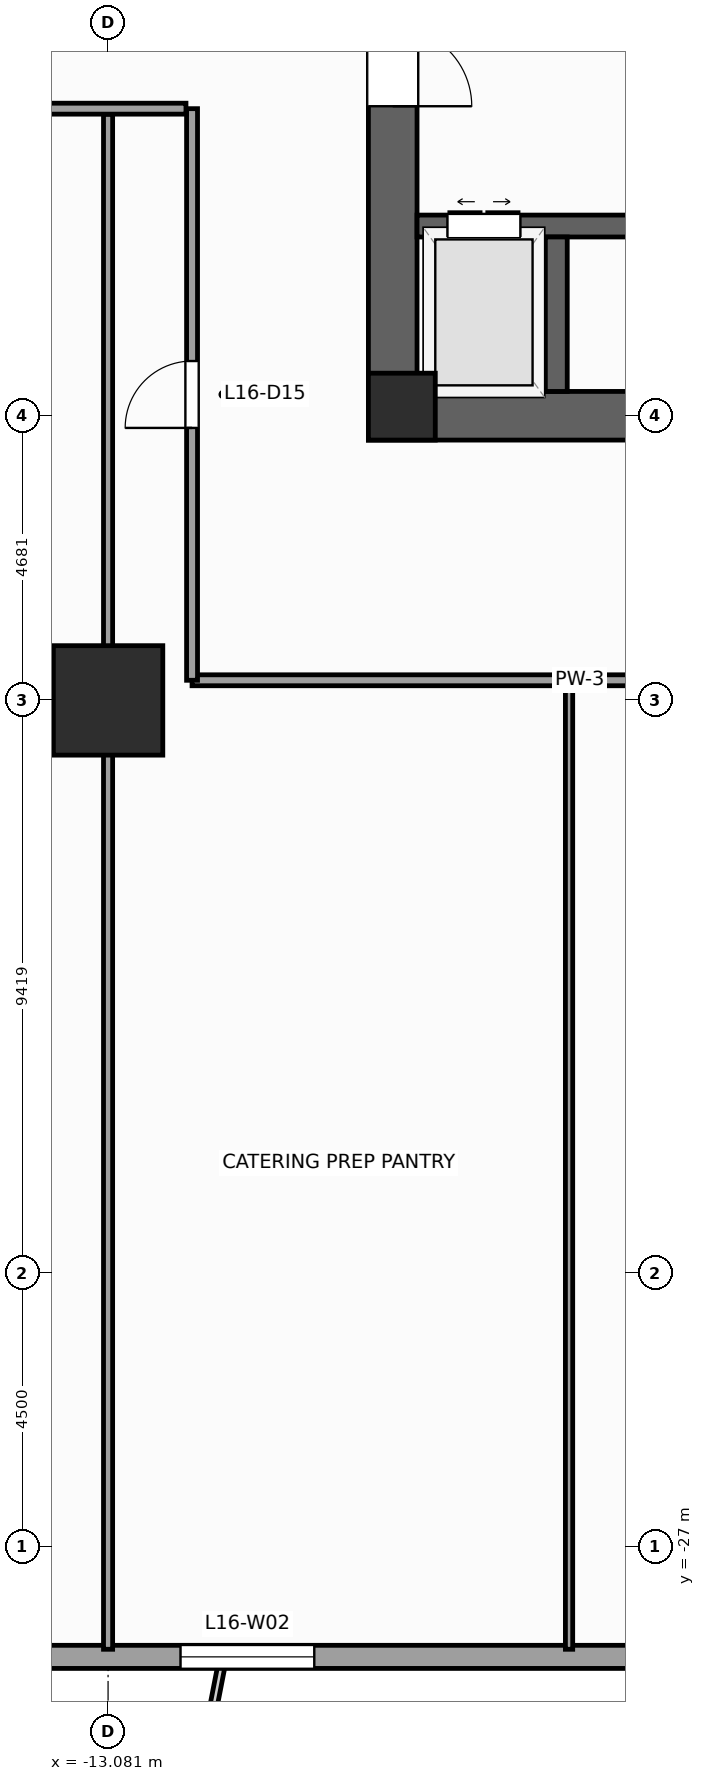
"""IFC4 building model, lengths in metres.
Left out: names, types, materials, properties, quantities, classifications, styles, units other than length and angle.
Written with IfcOpenShell. Run it as: python <this file> out.ifc"""

import sys

from ifc_helpers import new_model, si_unit, direction, frame, frame_2d, origin, origin_2d, place, context, subcontext, project, spatial, rectangle, extrude, source, transform, mapped, element, fill, save


model = new_model("IFC4")
c1 = context("Model", 3, precision=1e-05, world=origin(), true_north=direction((0.0, 1.0)))
c2 = subcontext(c1, "Body", "Model", "MODEL_VIEW")
j1 = project(units=[si_unit("LENGTHUNIT", "METRE"), si_unit("PLANEANGLEUNIT", "RADIAN")], contexts=[c1])
p1 = place(None, origin())
s1 = spatial("IfcSite", under=j1, at=p1, CompositionType="ELEMENT")
p2 = place(p1, origin())
s2 = spatial("IfcBuilding", under=s1, at=p2, CompositionType="ELEMENT")
p3 = place(p2, frame((0.0, 0.0, 70.0)))
s3 = spatial("IfcBuildingStorey", under=s2, at=p3, CompositionType="ELEMENT", Elevation=70.0)
p4 = place(p3, frame((-8.8, -8.4, 0.0), z_axis=(0.0, 0.0, 1.0), x_axis=(1.0, 0.0, 0.0)))
e1 = element("IfcWall", 1, at=p4, inside=s3, PredefinedType="SHEAR", context=c2, shape_type="SweptSolid", body=[
    extrude(rectangle(XDim=17.6, YDim=0.8, at=frame_2d((8.8, 0.0))), origin(), (0.0, 0.0, 1.0), 4.0),
])
p5 = place(p4, frame((8.15, 0.0, 0.0)))
e2 = element("IfcOpeningElement", 2, at=p5, cuts=e1, PredefinedType="OPENING", context=c2, shape_type="SweptSolid", body=[
    extrude(rectangle(XDim=1.3, YDim=2.2, at=frame_2d((0.65, 1.1))), frame((0.0, 0.41, 0.0), z_axis=(0.0, -1.0, 0.0), x_axis=(1.0, 0.0, 0.0)), (0.0, 0.0, 1.0), 0.82),
])
p6 = place(p3, frame((-8.4, -8.0, 0.0), z_axis=(0.0, 0.0, 1.0), x_axis=(0.0, 1.0, 0.0)))
e3 = element("IfcWall", 3, at=p6, inside=s3, PredefinedType="SHEAR", context=c2, shape_type="SweptSolid", body=[
    extrude(rectangle(XDim=16.0, YDim=0.8, at=frame_2d((8.0, 0.0))), origin(), (0.0, 0.0, 1.0), 4.0),
])
p7 = place(p6, frame((4.69, 0.0, 0.0)))
e4 = element("IfcOpeningElement", 4, at=p7, cuts=e3, PredefinedType="OPENING", context=c2, shape_type="SweptSolid", body=[
    extrude(rectangle(XDim=1.3, YDim=2.2, at=frame_2d((0.65, 1.1))), frame((0.0, 0.41, 0.0), z_axis=(0.0, -1.0, 0.0), x_axis=(1.0, 0.0, 0.0)), (0.0, 0.0, 1.0), 0.82),
])
p8 = place(p3, frame((-8.0, -5.28, 0.0), z_axis=(0.0, 0.0, 1.0), x_axis=(1.0, 0.0, 0.0)))
e5 = element("IfcWall", 5, at=p8, inside=s3, PredefinedType="SHEAR", context=c2, shape_type="SweptSolid", body=[
    extrude(rectangle(XDim=3.46, YDim=0.36, at=frame_2d((1.73, 0.0))), origin(), (0.0, 0.0, 1.0), 4.0),
])
p9 = place(p8, frame((0.5, 0.0, 0.0)))
e6 = element("IfcOpeningElement", 6, at=p9, cuts=e5, PredefinedType="OPENING", context=c2, shape_type="SweptSolid", body=[
    extrude(rectangle(XDim=1.2, YDim=2.25, at=frame_2d((0.6, 1.125))), frame((0.0, 0.19, 0.0), z_axis=(0.0, -1.0, 0.0), x_axis=(1.0, 0.0, 0.0)), (0.0, 0.0, 1.0), 0.38),
])
p10 = place(p3, frame((-5.71, -8.0, 0.0), z_axis=(0.0, 0.0, 1.0), x_axis=(0.0, 1.0, 0.0)))
e7 = element("IfcWall", 7, at=p10, inside=s3, PredefinedType="SHEAR", context=c2, shape_type="SweptSolid", body=[
    extrude(rectangle(XDim=2.54, YDim=0.36, at=frame_2d((1.27, 0.0))), origin(), (0.0, 0.0, 1.0), 4.0),
])
m1 = source(origin(), c2, "Body", "SweptSolid", [
    extrude(rectangle(XDim=1.1, YDim=1.1, at=origin_2d()), origin(), (0.0, 0.0, 1.0), 4.0),
])
p11 = place(p3, frame((-8.25, -8.25, 0.0), z_axis=(0.0, 0.0, 1.0), x_axis=(1.0, 0.0, 0.0)))
e8 = element("IfcColumn", 8, at=p11, inside=s3, PredefinedType="PILASTER", context=c2, shape_type="MappedRepresentation", body=[
    mapped(m1, transform((0.0, 0.0, 0.0), scale=1.0)),
])
m2 = source(origin(), c2, "Body", "SweptSolid", [
    extrude(rectangle(XDim=1.8, YDim=1.8, at=origin_2d()), origin(), (0.0, 0.0, 1.0), 4.0),
])
p12 = place(p3, frame((-13.081, -13.081, 0.0), z_axis=(0.0, 0.0, 1.0), x_axis=(1.0, 0.0, 0.0)))
e9 = element("IfcColumn", 9, at=p12, inside=s3, PredefinedType="COLUMN", context=c2, shape_type="MappedRepresentation", body=[
    mapped(m2, transform((0.0, 0.0, 0.0), scale=1.0)),
])
p13 = place(p3, frame((-25.69, -28.81, 0.0), z_axis=(0.0, 0.0, 1.0), x_axis=(1.0, 0.0, 0.0)))
e10 = element("IfcWall", 10, at=p13, inside=s3, PredefinedType="STANDARD", context=c2, shape_type="SweptSolid", body=[
    extrude(rectangle(XDim=51.38, YDim=0.38, at=frame_2d((25.69, 0.0))), origin(), (0.0, 0.0, 1.0), 3.12),
])
p14 = place(p13, frame((5.466, 0.0, 0.49)))
e11 = element("IfcOpeningElement", 11, at=p14, cuts=e10, PredefinedType="OPENING", context=c2, shape_type="SweptSolid", body=[
    extrude(rectangle(XDim=1.4, YDim=2.4, at=frame_2d((0.7, 1.2))), frame((0.0, 0.2, 0.0), z_axis=(0.0, -1.0, 0.0), x_axis=(1.0, 0.0, 0.0)), (0.0, 0.0, 1.0), 0.4),
])
p15 = place(p13, frame((13.8, 0.0, 0.49)))
e12 = element("IfcOpeningElement", 12, at=p15, cuts=e10, PredefinedType="OPENING", context=c2, shape_type="SweptSolid", body=[
    extrude(rectangle(XDim=2.2, YDim=2.4, at=frame_2d((1.1, 1.2))), frame((0.0, 0.2, 0.0), z_axis=(0.0, -1.0, 0.0), x_axis=(1.0, 0.0, 0.0)), (0.0, 0.0, 1.0), 0.4),
])
p16 = place(p13, frame((22.062, 0.0, 0.49)))
e13 = element("IfcOpeningElement", 13, at=p16, cuts=e10, PredefinedType="OPENING", context=c2, shape_type="SweptSolid", body=[
    extrude(rectangle(XDim=2.2, YDim=2.4, at=frame_2d((1.1, 1.2))), frame((0.0, 0.2, 0.0), z_axis=(0.0, -1.0, 0.0), x_axis=(1.0, 0.0, 0.0)), (0.0, 0.0, 1.0), 0.4),
])
p17 = place(p13, frame((35.338, 0.0, 0.49)))
e14 = element("IfcOpeningElement", 14, at=p17, cuts=e10, PredefinedType="OPENING", context=c2, shape_type="SweptSolid", body=[
    extrude(rectangle(XDim=2.2, YDim=2.4, at=frame_2d((1.1, 1.2))), frame((0.0, 0.2, 0.0), z_axis=(0.0, -1.0, 0.0), x_axis=(1.0, 0.0, 0.0)), (0.0, 0.0, 1.0), 0.4),
])
p18 = place(p13, frame((43.487, 0.0, 0.49)))
e15 = element("IfcOpeningElement", 15, at=p18, cuts=e10, PredefinedType="OPENING", context=c2, shape_type="SweptSolid", body=[
    extrude(rectangle(XDim=1.4, YDim=2.4, at=frame_2d((0.7, 1.2))), frame((0.0, 0.2, 0.0), z_axis=(0.0, -1.0, 0.0), x_axis=(1.0, 0.0, 0.0)), (0.0, 0.0, 1.0), 0.4),
])
p19 = place(p3, frame((-11.7, -12.75, 0.0), z_axis=(0.0, 0.0, 1.0), x_axis=(1.0, 0.0, 0.0)))
e16 = element("IfcWall", 16, at=p19, inside=s3, PredefinedType="PARTITIONING", context=c2, shape_type="SweptSolid", body=[
    extrude(rectangle(XDim=12.75, YDim=0.18, at=frame_2d((6.375, 0.0))), origin(), (0.0, 0.0, 1.0), 3.72),
])
p20 = place(p3, frame((-11.7, -12.75, 0.0), z_axis=(0.0, 0.0, 1.0), x_axis=(0.0, 1.0, 0.0)))
e17 = element("IfcWall", 17, at=p20, inside=s3, PredefinedType="PARTITIONING", context=c2, shape_type="SweptSolid", body=[
    extrude(rectangle(XDim=9.4, YDim=0.18, at=frame_2d((4.7, 0.0))), origin(), (0.0, 0.0, 1.0), 3.72),
])
p21 = place(p20, frame((4.15, 0.0, 0.0)))
e18 = element("IfcOpeningElement", 18, at=p21, cuts=e17, PredefinedType="OPENING", context=c2, shape_type="SweptSolid", body=[
    extrude(rectangle(XDim=1.1, YDim=2.2, at=frame_2d((0.55, 1.1))), frame((0.0, 0.1, 0.0), z_axis=(0.0, -1.0, 0.0), x_axis=(1.0, 0.0, 0.0)), (0.0, 0.0, 1.0), 0.2),
])
p22 = place(p3, frame((-28.685, -3.35, 0.0), z_axis=(0.0, 0.0, 1.0), x_axis=(1.0, 0.0, 0.0)))
e19 = element("IfcWall", 19, at=p22, inside=s3, PredefinedType="PARTITIONING", context=c2, shape_type="SweptSolid", body=[
    extrude(rectangle(XDim=16.885, YDim=0.18, at=frame_2d((8.442, 0.0))), origin(), (0.0, 0.0, 1.0), 3.72),
])
p23 = place(p22, frame((7.417, 0.0, 0.0)))
e20 = element("IfcOpeningElement", 20, at=p23, cuts=e19, PredefinedType="OPENING", context=c2, shape_type="SweptSolid", body=[
    extrude(rectangle(XDim=1.1, YDim=2.2, at=frame_2d((0.55, 1.1))), frame((0.0, 0.1, 0.0), z_axis=(0.0, -1.0, 0.0), x_axis=(1.0, 0.0, 0.0)), (0.0, 0.0, 1.0), 0.2),
])
p24 = place(p3, frame((-13.081, -28.685, 0.0), z_axis=(0.0, 0.0, 1.0), x_axis=(0.0, 1.0, 0.0)))
e21 = element("IfcWall", 21, at=p24, inside=s3, PredefinedType="PARTITIONING", context=c2, shape_type="SweptSolid", body=[
    extrude(rectangle(XDim=25.24, YDim=0.15, at=frame_2d((12.62, 0.0))), origin(), (0.0, 0.0, 1.0), 2.712),
])
p25 = place(p3, frame((-5.5, -28.685, 0.0), z_axis=(0.0, 0.0, 1.0), x_axis=(0.0, 1.0, 0.0)))
e22 = element("IfcWall", 22, at=p25, inside=s3, PredefinedType="PARTITIONING", context=c2, shape_type="SweptSolid", body=[
    extrude(rectangle(XDim=15.84, YDim=0.12, at=frame_2d((7.92, 0.0))), origin(), (0.0, 0.0, 1.0), 3.72),
])
m3 = source(origin(), c2, "Body", "SweptSolid", [
    extrude(rectangle(XDim=2.2, YDim=2.4, at=frame_2d((1.1, 1.2))), frame((0.0, 0.03, 0.0), z_axis=(0.0, -1.0, 0.0), x_axis=(1.0, 0.0, 0.0)), (0.0, 0.0, 1.0), 0.06),
])
p26 = place(p15, origin())
e23 = element("IfcWindow", 23, at=p26, inside=s3, PartitioningType="SINGLE_PANEL", PredefinedType="WINDOW", context=c2, shape_type="MappedRepresentation", body=[
    mapped(m3, transform((0.0, 0.0, 0.0), scale=1.0)),
])
fill(e12, e23)
m4 = source(origin(), c2, "Body", "SweptSolid", [
    extrude(rectangle(XDim=1.3, YDim=2.2, at=frame_2d((0.65, 1.1))), frame((0.0, 0.025, 0.0), z_axis=(0.0, -1.0, 0.0), x_axis=(1.0, 0.0, 0.0)), (0.0, 0.0, 1.0), 0.05),
])
p27 = place(p7, frame((1.3, 0.0, 0.0), z_axis=(0.0, 0.0, 1.0), x_axis=(-1.0, 0.0, 0.0)))
e24 = element("IfcDoor", 24, at=p27, inside=s3, OperationType="SINGLE_SWING_LEFT", PredefinedType="DOOR", context=c2, shape_type="MappedRepresentation", body=[
    mapped(m4, transform((0.0, 0.0, 0.0), scale=1.0)),
])
fill(e4, e24)
m5 = source(origin(), c2, "Body", "SweptSolid", [
    extrude(rectangle(XDim=1.2, YDim=2.25, at=frame_2d((0.6, 1.125))), frame((0.0, 0.025, 0.0), z_axis=(0.0, -1.0, 0.0), x_axis=(1.0, 0.0, 0.0)), (0.0, 0.0, 1.0), 0.05),
])
p28 = place(p9, origin())
e25 = element("IfcDoor", 25, at=p28, inside=s3, OperationType="DOUBLE_DOOR_SLIDING", PredefinedType="DOOR", context=c2, shape_type="MappedRepresentation", body=[
    mapped(m5, transform((0.0, 0.0, 0.0), scale=1.0)),
])
fill(e6, e25)
m6 = source(origin(), c2, "Body", "SweptSolid", [
    extrude(rectangle(XDim=1.1, YDim=2.2, at=frame_2d((0.55, 1.1))), frame((0.0, 0.025, 0.0), z_axis=(0.0, -1.0, 0.0), x_axis=(1.0, 0.0, 0.0)), (0.0, 0.0, 1.0), 0.05),
])
p29 = place(p21, origin())
e26 = element("IfcDoor", 26, at=p29, inside=s3, OperationType="SINGLE_SWING_LEFT", PredefinedType="DOOR", context=c2, shape_type="MappedRepresentation", body=[
    mapped(m6, transform((0.0, 0.0, 0.0), scale=1.0)),
])
fill(e18, e26)
save(model, sys.argv[1])
